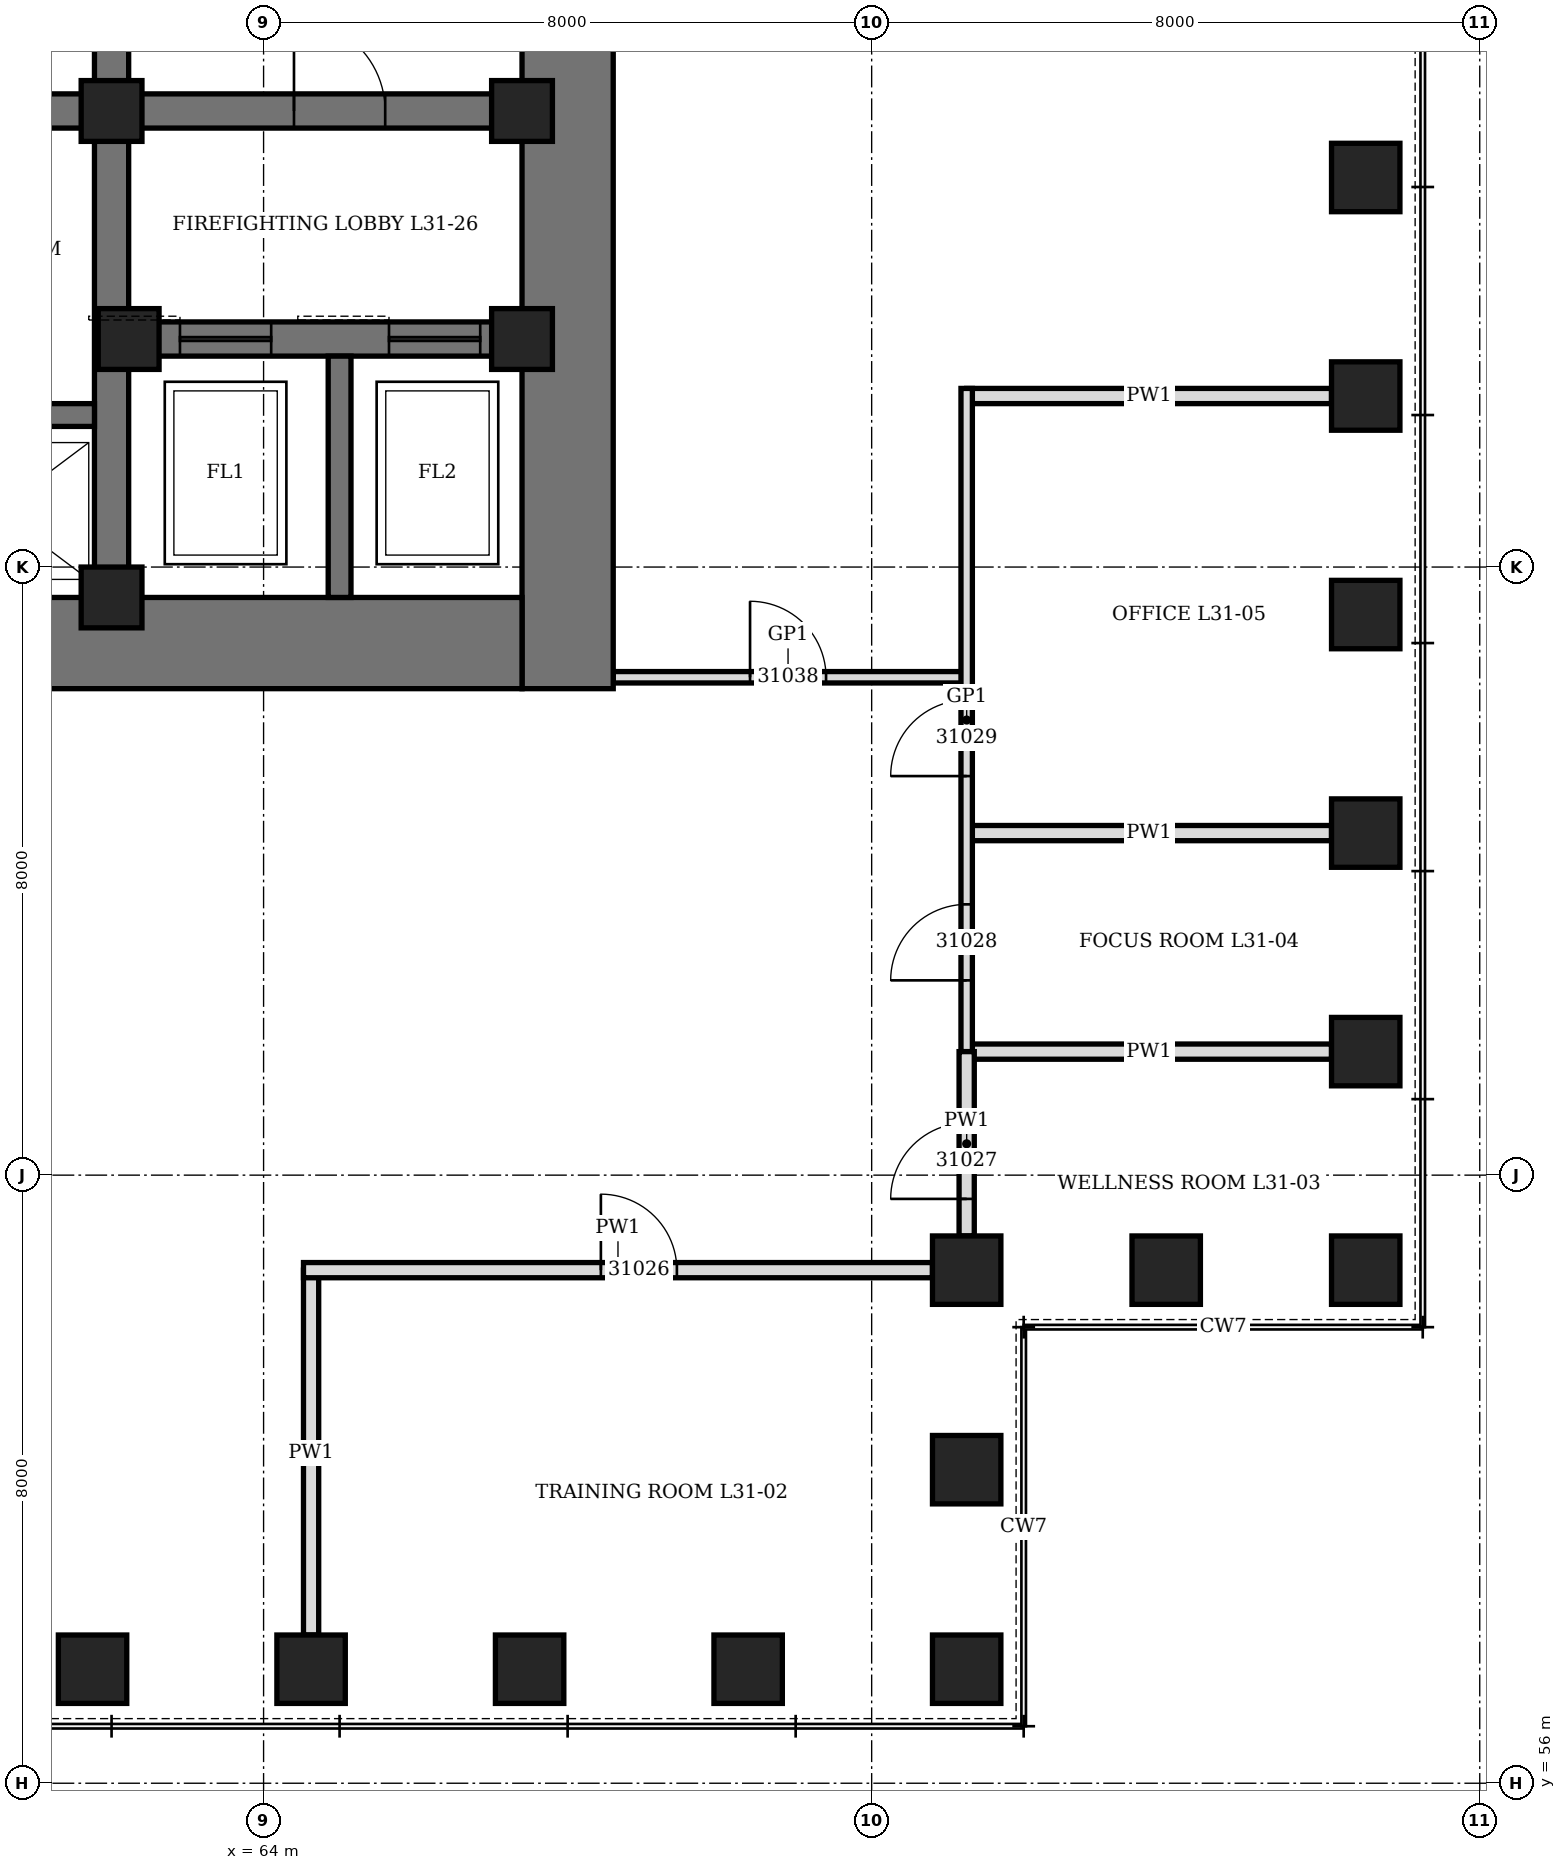
"""IFC4 building model, lengths in metres.
Left out: names, types, materials, properties, quantities, classifications, styles, units other than length and angle.
Written with IfcOpenShell. Run it as: python <this file> out.ifc"""

import sys

from ifc_helpers import new_model, si_unit, direction, frame, frame_2d, origin, origin_2d, place, context, subcontext, project, spatial, rectangle, hollow_rectangle, extrude, element, fill, save


model = new_model("IFC4")
c1 = context("Model", 3, precision=1e-05, world=origin(), true_north=direction((0.0, 1.0)))
c2 = subcontext(c1, "Body", "Model", "MODEL_VIEW")
j1 = project(units=[si_unit("LENGTHUNIT", "METRE"), si_unit("PLANEANGLEUNIT", "RADIAN")], contexts=[c1])
p1 = place(None, origin())
s1 = spatial("IfcSite", under=j1, at=p1, CompositionType="ELEMENT")
p2 = place(p1, origin())
s2 = spatial("IfcBuilding", under=s1, at=p2, CompositionType="ELEMENT")
p3 = place(p2, frame((0.0, 0.0, 141.7)))
s3 = spatial("IfcBuildingStorey", under=s2, at=p3, CompositionType="ELEMENT", Elevation=141.7)
for number, where, z_axis, x_axis in (
    (1, (61.75, 57.5, 0.0), (0.0, 0.0, 1.0), (1.0, 0.0, 0.0)),
    (2, (64.625, 57.5, 0.0), (0.0, 0.0, 1.0), (1.0, 0.0, 0.0)),
    (3, (67.5, 57.5, 0.0), (0.0, 0.0, 1.0), (1.0, 0.0, 0.0)),
    (4, (70.375, 57.5, 0.0), (0.0, 0.0, 1.0), (1.0, 0.0, 0.0)),
    (5, (73.25, 57.5, 0.0), (0.0, 0.0, 1.0), (0.0, 1.0, 0.0)),
    (6, (73.25, 60.125, 0.0), (0.0, 0.0, 1.0), (0.0, 1.0, 0.0)),
    (7, (73.25, 62.75, 0.0), (0.0, 0.0, 1.0), (1.0, 0.0, 0.0)),
    (8, (75.875, 62.75, 0.0), (0.0, 0.0, 1.0), (1.0, 0.0, 0.0)),
    (9, (78.5, 62.75, 0.0), (0.0, 0.0, 1.0), (0.0, 1.0, 0.0)),
    (10, (78.5, 65.625, 0.0), (0.0, 0.0, 1.0), (0.0, 1.0, 0.0)),
    (11, (78.5, 68.5, 0.0), (0.0, 0.0, 1.0), (0.0, 1.0, 0.0)),
    (12, (78.5, 71.375, 0.0), (0.0, 0.0, 1.0), (0.0, 1.0, 0.0)),
    (13, (78.5, 74.25, 0.0), (0.0, 0.0, 1.0), (0.0, 1.0, 0.0)),
    (14, (78.5, 77.125, 0.0), (0.0, 0.0, 1.0), (0.0, 1.0, 0.0)),
):
    element("IfcColumn", number, at=place(p3, frame(where, z_axis=z_axis, x_axis=x_axis)), inside=s3, PredefinedType="COLUMN", context=c2, shape_type="SweptSolid", body=[
        extrude(hollow_rectangle(XDim=0.9, YDim=0.9, WallThickness=0.12, at=origin_2d()), origin(), (0.0, 0.0, 1.0), 4.2),
    ])
p4 = place(p3, frame((68.0, 70.4, 0.0), z_axis=(0.0, 0.0, 1.0), x_axis=(0.0, 1.0, 0.0)))
e15 = element("IfcWall", 15, at=p4, inside=s3, PredefinedType="SHEAR", context=c2, shape_type="SweptSolid", body=[
    extrude(rectangle(XDim=19.2, YDim=1.2, at=frame_2d((9.6, 0.0))), origin(), (0.0, 0.0, 1.0), 4.2),
])
p5 = place(p4, frame((8.6, 0.0, 0.0)))
e16 = element("IfcOpeningElement", 16, at=p5, cuts=e15, PredefinedType="OPENING", context=c2, shape_type="SweptSolid", body=[
    extrude(rectangle(XDim=2.0, YDim=2.4, at=frame_2d((1.0, 1.2))), frame((0.0, 0.61, 0.0), z_axis=(0.0, -1.0, 0.0), x_axis=(1.0, 0.0, 0.0)), (0.0, 0.0, 1.0), 1.22),
])
p6 = place(p3, frame((44.6, 71.0, 0.0), z_axis=(0.0, 0.0, 1.0), x_axis=(1.0, 0.0, 0.0)))
e17 = element("IfcWall", 17, at=p6, inside=s3, PredefinedType="SHEAR", context=c2, shape_type="SweptSolid", body=[
    extrude(rectangle(XDim=22.8, YDim=1.2, at=frame_2d((11.4, 0.0))), origin(), (0.0, 0.0, 1.0), 4.2),
])
p7 = place(p3, frame((62.0, 71.6, 0.0), z_axis=(0.0, 0.0, 1.0), x_axis=(0.0, 1.0, 0.0)))
e18 = element("IfcWall", 18, at=p7, inside=s3, PredefinedType="SHEAR", context=c2, shape_type="SweptSolid", body=[
    extrude(rectangle(XDim=16.8, YDim=0.45, at=frame_2d((8.4, 0.0))), origin(), (0.0, 0.0, 1.0), 4.2),
])
p8 = place(p7, frame((7.5, 0.0, 0.0)))
e19 = element("IfcOpeningElement", 19, at=p8, cuts=e18, PredefinedType="OPENING", context=c2, shape_type="SweptSolid", body=[
    extrude(rectangle(XDim=1.8, YDim=2.4, at=frame_2d((0.9, 1.2))), frame((0.0, 0.235, 0.0), z_axis=(0.0, -1.0, 0.0), x_axis=(1.0, 0.0, 0.0)), (0.0, 0.0, 1.0), 0.47),
])
p9 = place(p3, frame((62.225, 75.0, 0.0), z_axis=(0.0, 0.0, 1.0), x_axis=(1.0, 0.0, 0.0)))
e20 = element("IfcWall", 20, at=p9, inside=s3, PredefinedType="SHEAR", context=c2, shape_type="SweptSolid", body=[
    extrude(rectangle(XDim=5.175, YDim=0.45, at=frame_2d((2.587, 0.0))), origin(), (0.0, 0.0, 1.0), 4.2),
])
p10 = place(p9, frame((0.675, 0.0, 0.0)))
e21 = element("IfcOpeningElement", 21, at=p10, cuts=e20, PredefinedType="OPENING", context=c2, shape_type="SweptSolid", body=[
    extrude(rectangle(XDim=1.2, YDim=2.2, at=frame_2d((0.6, 1.1))), frame((0.0, 0.235, 0.0), z_axis=(0.0, -1.0, 0.0), x_axis=(1.0, 0.0, 0.0)), (0.0, 0.0, 1.0), 0.47),
])
p11 = place(p9, frame((3.425, 0.0, 0.0)))
e22 = element("IfcOpeningElement", 22, at=p11, cuts=e20, PredefinedType="OPENING", context=c2, shape_type="SweptSolid", body=[
    extrude(rectangle(XDim=1.2, YDim=2.2, at=frame_2d((0.6, 1.1))), frame((0.0, 0.235, 0.0), z_axis=(0.0, -1.0, 0.0), x_axis=(1.0, 0.0, 0.0)), (0.0, 0.0, 1.0), 0.47),
])
p12 = place(p3, frame((62.225, 78.0, 0.0), z_axis=(0.0, 0.0, 1.0), x_axis=(1.0, 0.0, 0.0)))
e23 = element("IfcWall", 23, at=p12, inside=s3, PredefinedType="SHEAR", context=c2, shape_type="SweptSolid", body=[
    extrude(rectangle(XDim=5.175, YDim=0.45, at=frame_2d((2.587, 0.0))), origin(), (0.0, 0.0, 1.0), 4.2),
])
p13 = place(p12, frame((2.175, 0.0, 0.0)))
e24 = element("IfcOpeningElement", 24, at=p13, cuts=e23, PredefinedType="OPENING", context=c2, shape_type="SweptSolid", body=[
    extrude(rectangle(XDim=1.2, YDim=2.1, at=frame_2d((0.6, 1.05))), frame((0.0, 0.235, 0.0), z_axis=(0.0, -1.0, 0.0), x_axis=(1.0, 0.0, 0.0)), (0.0, 0.0, 1.0), 0.47),
])
p14 = place(p3, frame((50.225, 78.0, 0.0), z_axis=(0.0, 0.0, 1.0), x_axis=(1.0, 0.0, 0.0)))
e25 = element("IfcWall", 25, at=p14, inside=s3, PredefinedType="SHEAR", context=c2, shape_type="SweptSolid", body=[
    extrude(rectangle(XDim=11.55, YDim=0.45, at=frame_2d((5.775, 0.0))), origin(), (0.0, 0.0, 1.0), 4.2),
])
p15 = place(p14, frame((0.825, 0.0, 0.0)))
e26 = element("IfcOpeningElement", 26, at=p15, cuts=e25, PredefinedType="OPENING", context=c2, shape_type="SweptSolid", body=[
    extrude(rectangle(XDim=0.9, YDim=2.1, at=frame_2d((0.45, 1.05))), frame((0.0, 0.235, 0.0), z_axis=(0.0, -1.0, 0.0), x_axis=(1.0, 0.0, 0.0)), (0.0, 0.0, 1.0), 0.47),
])
p16 = place(p14, frame((3.825, 0.0, 0.0)))
e27 = element("IfcOpeningElement", 27, at=p16, cuts=e25, PredefinedType="OPENING", context=c2, shape_type="SweptSolid", body=[
    extrude(rectangle(XDim=0.9, YDim=2.1, at=frame_2d((0.45, 1.05))), frame((0.0, 0.235, 0.0), z_axis=(0.0, -1.0, 0.0), x_axis=(1.0, 0.0, 0.0)), (0.0, 0.0, 1.0), 0.47),
])
p17 = place(p14, frame((6.825, 0.0, 0.0)))
e28 = element("IfcOpeningElement", 28, at=p17, cuts=e25, PredefinedType="OPENING", context=c2, shape_type="SweptSolid", body=[
    extrude(rectangle(XDim=0.9, YDim=2.1, at=frame_2d((0.45, 1.05))), frame((0.0, 0.235, 0.0), z_axis=(0.0, -1.0, 0.0), x_axis=(1.0, 0.0, 0.0)), (0.0, 0.0, 1.0), 0.47),
])
p18 = place(p14, frame((9.825, 0.0, 0.0)))
e29 = element("IfcOpeningElement", 29, at=p18, cuts=e25, PredefinedType="OPENING", context=c2, shape_type="SweptSolid", body=[
    extrude(rectangle(XDim=0.9, YDim=2.1, at=frame_2d((0.45, 1.05))), frame((0.0, 0.235, 0.0), z_axis=(0.0, -1.0, 0.0), x_axis=(1.0, 0.0, 0.0)), (0.0, 0.0, 1.0), 0.47),
])
p19 = place(p3, frame((50.225, 74.0, 0.0), z_axis=(0.0, 0.0, 1.0), x_axis=(1.0, 0.0, 0.0)))
e30 = element("IfcWall", 30, at=p19, inside=s3, PredefinedType="SHEAR", context=c2, shape_type="SweptSolid", body=[
    extrude(rectangle(XDim=11.55, YDim=0.3, at=frame_2d((5.775, 0.0))), origin(), (0.0, 0.0, 1.0), 4.2),
])
p20 = place(p3, frame((65.0, 71.6, 0.0), z_axis=(0.0, 0.0, 1.0), x_axis=(0.0, 1.0, 0.0)))
e31 = element("IfcWall", 31, at=p20, inside=s3, PredefinedType="SHEAR", context=c2, shape_type="SweptSolid", body=[
    extrude(rectangle(XDim=3.175, YDim=0.3, at=frame_2d((1.587, 0.0))), origin(), (0.0, 0.0, 1.0), 4.2),
])
for number, where, z_axis, x_axis in (
    (32, (62.0, 71.6, 0.0), (0.0, 0.0, 1.0), (1.0, 0.0, 0.0)),
    (33, (62.0, 78.0, 0.0), (0.0, 0.0, 1.0), (1.0, 0.0, 0.0)),
    (34, (62.225, 75.0, 0.0), (0.0, 0.0, 1.0), (1.0, 0.0, 0.0)),
    (35, (67.4, 75.0, 0.0), (0.0, 0.0, 1.0), (1.0, 0.0, 0.0)),
    (36, (67.4, 78.0, 0.0), (0.0, 0.0, 1.0), (1.0, 0.0, 0.0)),
):
    element("IfcColumn", number, at=place(p3, frame(where, z_axis=z_axis, x_axis=x_axis)), inside=s3, PredefinedType="COLUMN", context=c2, shape_type="SweptSolid", body=[
        extrude(hollow_rectangle(XDim=0.8, YDim=0.8, WallThickness=0.1, at=origin_2d()), origin(), (0.0, 0.0, 1.0), 4.2),
    ])
p21 = place(p3, frame((64.625, 57.95, 0.0), z_axis=(0.0, 0.0, 1.0), x_axis=(0.0, 1.0, 0.0)))
e37 = element("IfcWall", 37, at=p21, inside=s3, PredefinedType="PARTITIONING", context=c2, shape_type="SweptSolid", body=[
    extrude(rectangle(XDim=4.8, YDim=0.2, at=frame_2d((2.4, 0.0))), origin(), (0.0, 0.0, 1.0), 3.278),
])
for number, where, z_axis, x_axis in (
    (38, (73.25, 65.625, 0.0), (0.0, 0.0, 1.0), (1.0, 0.0, 0.0)),
    (39, (73.25, 68.5, 0.0), (0.0, 0.0, 1.0), (1.0, 0.0, 0.0)),
    (40, (73.25, 74.25, 0.0), (0.0, 0.0, 1.0), (1.0, 0.0, 0.0)),
):
    element("IfcWall", number, at=place(p3, frame(where, z_axis=z_axis, x_axis=x_axis)), inside=s3, PredefinedType="PARTITIONING", context=c2, shape_type="SweptSolid", body=[
        extrude(rectangle(XDim=4.8, YDim=0.2, at=frame_2d((2.4, 0.0))), origin(), (0.0, 0.0, 1.0), 3.428),
    ])
p22 = place(p3, frame((64.525, 62.75, 0.0), z_axis=(0.0, 0.0, 1.0), x_axis=(1.0, 0.0, 0.0)))
e41 = element("IfcWall", 41, at=p22, inside=s3, PredefinedType="PARTITIONING", context=c2, shape_type="SweptSolid", body=[
    extrude(rectangle(XDim=8.275, YDim=0.2, at=frame_2d((4.138, 0.0))), origin(), (0.0, 0.0, 1.0), 4.04),
])
p23 = place(p22, frame((3.913, 0.0, 0.0)))
e42 = element("IfcOpeningElement", 42, at=p23, cuts=e41, PredefinedType="OPENING", context=c2, shape_type="SweptSolid", body=[
    extrude(rectangle(XDim=1.0, YDim=2.1, at=frame_2d((0.5, 1.05))), frame((0.0, 0.11, 0.0), z_axis=(0.0, -1.0, 0.0), x_axis=(1.0, 0.0, 0.0)), (0.0, 0.0, 1.0), 0.22),
])
p24 = place(p3, frame((68.6, 70.55, 0.0), z_axis=(0.0, 0.0, 1.0), x_axis=(1.0, 0.0, 0.0)))
e43 = element("IfcWall", 43, at=p24, inside=s3, PredefinedType="PARTITIONING", context=c2, shape_type="SweptSolid", body=[
    extrude(rectangle(XDim=4.6, YDim=0.15, at=frame_2d((2.3, 0.0))), origin(), (0.0, 0.0, 1.0), 4.04),
])
p25 = place(p24, frame((1.8, 0.0, 0.0)))
e44 = element("IfcOpeningElement", 44, at=p25, cuts=e43, PredefinedType="OPENING", context=c2, shape_type="SweptSolid", body=[
    extrude(rectangle(XDim=1.0, YDim=2.4, at=frame_2d((0.5, 1.2))), frame((0.0, 0.085, 0.0), z_axis=(0.0, -1.0, 0.0), x_axis=(1.0, 0.0, 0.0)), (0.0, 0.0, 1.0), 0.17),
])
p26 = place(p3, frame((73.25, 65.625, 0.0), z_axis=(0.0, 0.0, 1.0), x_axis=(0.0, 1.0, 0.0)))
e45 = element("IfcWall", 45, at=p26, inside=s3, PredefinedType="PARTITIONING", context=c2, shape_type="SweptSolid", body=[
    extrude(rectangle(XDim=8.725, YDim=0.15, at=frame_2d((4.363, 0.0))), origin(), (0.0, 0.0, 1.0), 4.04),
])
p27 = place(p26, frame((0.938, 0.0, 0.0)))
e46 = element("IfcOpeningElement", 46, at=p27, cuts=e45, PredefinedType="OPENING", context=c2, shape_type="SweptSolid", body=[
    extrude(rectangle(XDim=1.0, YDim=2.4, at=frame_2d((0.5, 1.2))), frame((0.0, 0.085, 0.0), z_axis=(0.0, -1.0, 0.0), x_axis=(1.0, 0.0, 0.0)), (0.0, 0.0, 1.0), 0.17),
])
p28 = place(p26, frame((3.625, 0.0, 0.0)))
e47 = element("IfcOpeningElement", 47, at=p28, cuts=e45, PredefinedType="OPENING", context=c2, shape_type="SweptSolid", body=[
    extrude(rectangle(XDim=1.0, YDim=2.1, at=frame_2d((0.5, 1.05))), frame((0.0, 0.085, 0.0), z_axis=(0.0, -1.0, 0.0), x_axis=(1.0, 0.0, 0.0)), (0.0, 0.0, 1.0), 0.17),
])
p29 = place(p3, frame((73.25, 63.2, 0.0), z_axis=(0.0, 0.0, 1.0), x_axis=(0.0, 1.0, 0.0)))
e48 = element("IfcWall", 48, at=p29, inside=s3, PredefinedType="PARTITIONING", context=c2, shape_type="SweptSolid", body=[
    extrude(rectangle(XDim=2.425, YDim=0.2, at=frame_2d((1.212, 0.0))), origin(), (0.0, 0.0, 1.0), 4.04),
])
p30 = place(p29, frame((0.488, 0.0, 0.0)))
e49 = element("IfcOpeningElement", 49, at=p30, cuts=e48, PredefinedType="OPENING", context=c2, shape_type="SweptSolid", body=[
    extrude(rectangle(XDim=1.0, YDim=2.1, at=frame_2d((0.5, 1.05))), frame((0.0, 0.11, 0.0), z_axis=(0.0, -1.0, 0.0), x_axis=(1.0, 0.0, 0.0)), (0.0, 0.0, 1.0), 0.22),
])
p31 = place(p13, origin())
e50 = element("IfcDoor", 50, at=p31, inside=s3, OperationType="SINGLE_SWING_RIGHT", PredefinedType="DOOR", context=c2, shape_type="SweptSolid", body=[
    extrude(rectangle(XDim=1.2, YDim=2.1, at=frame_2d((0.6, 1.05))), frame((0.0, 0.225, 0.0), z_axis=(0.0, -1.0, 0.0), x_axis=(1.0, 0.0, 0.0)), (0.0, 0.0, 1.0), 0.449),
])
fill(e24, e50)
p32 = place(p10, origin())
e51 = element("IfcDoor", 51, at=p32, inside=s3, OperationType="SLIDING_TO_LEFT", PredefinedType="DOOR", context=c2, shape_type="SweptSolid", body=[
    extrude(rectangle(XDim=1.2, YDim=2.2, at=frame_2d((0.6, 1.1))), frame((0.0, 0.225, 0.0), z_axis=(0.0, -1.0, 0.0), x_axis=(1.0, 0.0, 0.0)), (0.0, 0.0, 1.0), 0.449),
])
fill(e21, e51)
p33 = place(p11, origin())
e52 = element("IfcDoor", 52, at=p33, inside=s3, OperationType="SLIDING_TO_LEFT", PredefinedType="DOOR", context=c2, shape_type="SweptSolid", body=[
    extrude(rectangle(XDim=1.2, YDim=2.2, at=frame_2d((0.6, 1.1))), frame((0.0, 0.225, 0.0), z_axis=(0.0, -1.0, 0.0), x_axis=(1.0, 0.0, 0.0)), (0.0, 0.0, 1.0), 0.449),
])
fill(e22, e52)
p34 = place(p23, origin())
e53 = element("IfcDoor", 53, at=p34, inside=s3, OperationType="SINGLE_SWING_LEFT", PredefinedType="DOOR", context=c2, shape_type="SweptSolid", body=[
    extrude(rectangle(XDim=1.0, YDim=2.1, at=frame_2d((0.5, 1.05))), frame((0.0, 0.1, 0.0), z_axis=(0.0, -1.0, 0.0), x_axis=(1.0, 0.0, 0.0)), (0.0, 0.0, 1.0), 0.199),
])
fill(e42, e53)
p35 = place(p30, origin())
e54 = element("IfcDoor", 54, at=p35, inside=s3, OperationType="SINGLE_SWING_LEFT", PredefinedType="DOOR", context=c2, shape_type="SweptSolid", body=[
    extrude(rectangle(XDim=1.0, YDim=2.1, at=frame_2d((0.5, 1.05))), frame((0.0, 0.1, 0.0), z_axis=(0.0, -1.0, 0.0), x_axis=(1.0, 0.0, 0.0)), (0.0, 0.0, 1.0), 0.199),
])
fill(e49, e54)
p36 = place(p27, origin())
e55 = element("IfcDoor", 55, at=p36, inside=s3, OperationType="SINGLE_SWING_RIGHT", PredefinedType="DOOR", context=c2, shape_type="SweptSolid", body=[
    extrude(rectangle(XDim=1.0, YDim=2.4, at=frame_2d((0.5, 1.2))), frame((0.0, 0.075, 0.0), z_axis=(0.0, -1.0, 0.0), x_axis=(1.0, 0.0, 0.0)), (0.0, 0.0, 1.0), 0.149),
])
fill(e46, e55)
p37 = place(p28, origin())
e56 = element("IfcDoor", 56, at=p37, inside=s3, OperationType="SINGLE_SWING_LEFT", PredefinedType="DOOR", context=c2, shape_type="SweptSolid", body=[
    extrude(rectangle(XDim=1.0, YDim=2.1, at=frame_2d((0.5, 1.05))), frame((0.0, 0.075, 0.0), z_axis=(0.0, -1.0, 0.0), x_axis=(1.0, 0.0, 0.0)), (0.0, 0.0, 1.0), 0.149),
])
fill(e47, e56)
p38 = place(p25, origin())
e57 = element("IfcDoor", 57, at=p38, inside=s3, OperationType="SINGLE_SWING_RIGHT", PredefinedType="DOOR", context=c2, shape_type="SweptSolid", body=[
    extrude(rectangle(XDim=1.0, YDim=2.4, at=frame_2d((0.5, 1.2))), frame((0.0, 0.075, 0.0), z_axis=(0.0, -1.0, 0.0), x_axis=(1.0, 0.0, 0.0)), (0.0, 0.0, 1.0), 0.149),
])
fill(e44, e57)
save(model, sys.argv[1])
